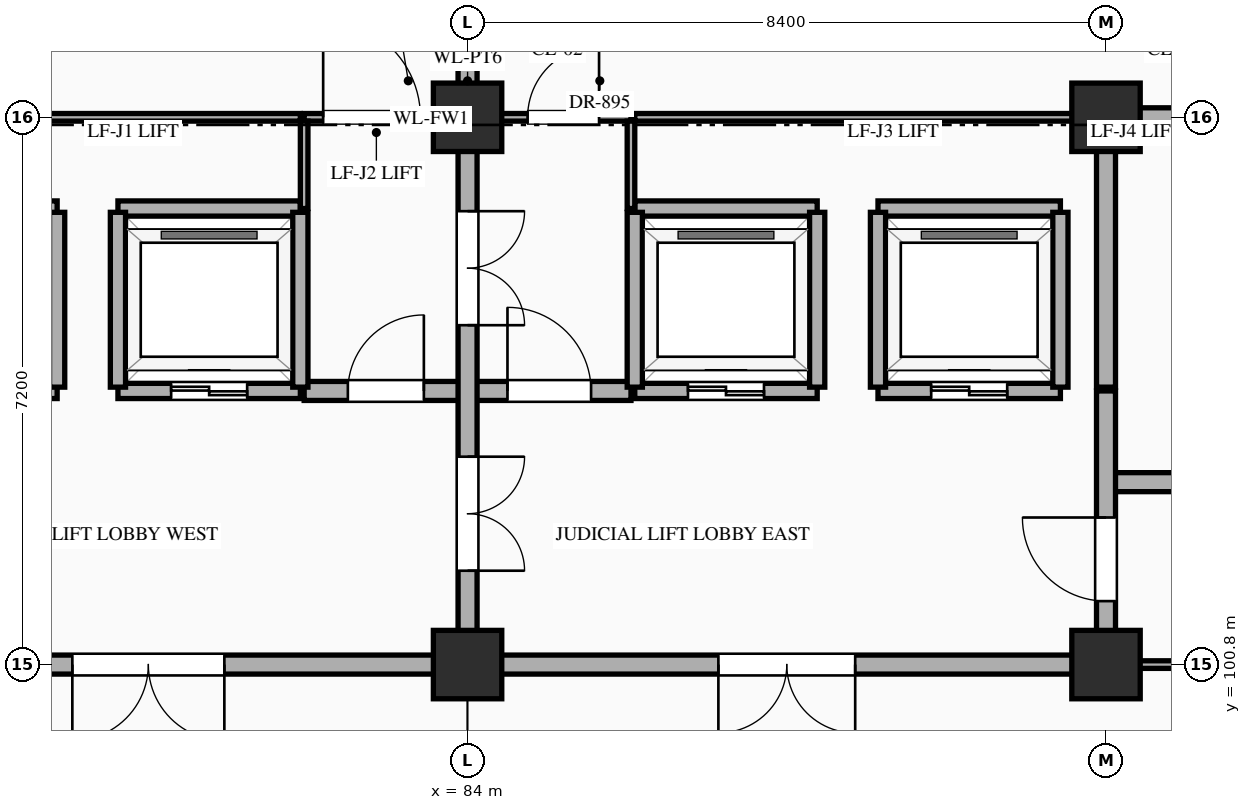
"""IFC4 building model, lengths in metres.
Left out: names, types, materials, properties, quantities, classifications, styles, units other than length and angle.
Written with IfcOpenShell. Run it as: python <this file> out.ifc"""

import sys

from ifc_helpers import new_model, si_unit, direction, frame, frame_2d, origin, origin_2d, place, context, subcontext, project, spatial, rectangle, extrude, element, fill, save


model = new_model("IFC4")
c1 = context("Model", 3, precision=1e-05, world=origin(), true_north=direction((0.0, 1.0)))
c2 = subcontext(c1, "Body", "Model", "MODEL_VIEW")
j1 = project(units=[si_unit("LENGTHUNIT", "METRE"), si_unit("PLANEANGLEUNIT", "RADIAN")], contexts=[c1])
p1 = place(None, origin())
s1 = spatial("IfcSite", under=j1, at=p1, CompositionType="ELEMENT")
p2 = place(p1, origin())
s2 = spatial("IfcBuilding", under=s1, at=p2, CompositionType="ELEMENT")
p3 = place(p2, origin())
s3 = spatial("IfcBuildingStorey", under=s2, at=p3, CompositionType="ELEMENT", Elevation=0.0)
for number, where, z_axis, x_axis in (
    (1, (84.0, 100.8, 0.0), (0.0, 0.0, 1.0), (1.0, 0.0, 0.0)),
    (2, (84.0, 108.0, 0.0), (0.0, 0.0, 1.0), (1.0, 0.0, 0.0)),
    (3, (92.4, 100.8, 0.0), (0.0, 0.0, 1.0), (1.0, 0.0, 0.0)),
    (4, (92.4, 108.0, 0.0), (0.0, 0.0, 1.0), (1.0, 0.0, 0.0)),
):
    element("IfcColumn", number, at=place(p3, frame(where, z_axis=z_axis, x_axis=x_axis)), inside=s3, PredefinedType="COLUMN", context=c2, shape_type="SweptSolid", body=[
        extrude(rectangle(XDim=0.9, YDim=0.9, at=origin_2d()), origin(), (0.0, 0.0, 1.0), 5.4),
    ])
p4 = place(p3, frame((75.6, 100.8, 0.0), z_axis=(0.0, 0.0, 1.0), x_axis=(1.0, 0.0, 0.0)))
e5 = element("IfcWall", 5, at=p4, inside=s3, PredefinedType="STANDARD", context=c2, shape_type="SweptSolid", body=[
    extrude(rectangle(XDim=16.8, YDim=0.25, at=frame_2d((8.4, 0.0))), origin(), (0.0, 0.0, 1.0), 4.27),
])
p5 = place(p4, frame((3.2, 0.0, 0.0)))
e6 = element("IfcOpeningElement", 6, at=p5, cuts=e5, PredefinedType="OPENING", context=c2, shape_type="SweptSolid", body=[
    extrude(rectangle(XDim=2.0, YDim=2.4, at=frame_2d((1.0, 1.2))), frame((0.0, 0.137, 0.0), z_axis=(0.0, -1.0, 0.0), x_axis=(1.0, 0.0, 0.0)), (0.0, 0.0, 1.0), 0.274),
])
p6 = place(p4, frame((11.7, 0.0, 0.0)))
e7 = element("IfcOpeningElement", 7, at=p6, cuts=e5, PredefinedType="OPENING", context=c2, shape_type="SweptSolid", body=[
    extrude(rectangle(XDim=1.8, YDim=2.35, at=frame_2d((0.9, 1.175))), frame((0.0, 0.137, 0.0), z_axis=(0.0, -1.0, 0.0), x_axis=(1.0, 0.0, 0.0)), (0.0, 0.0, 1.0), 0.274),
])
p7 = place(p3, frame((92.4, 100.8, 0.0), z_axis=(0.0, 0.0, 1.0), x_axis=(1.0, 0.0, 0.0)))
e8 = element("IfcWall", 8, at=p7, inside=s3, PredefinedType="STANDARD", context=c2, shape_type="SweptSolid", body=[
    extrude(rectangle(XDim=4.2, YDim=0.1, at=frame_2d((2.1, 0.0))), origin(), (0.0, 0.0, 1.0), 4.27),
])
p8 = place(p7, frame((1.46, 0.0, 0.0)))
e9 = element("IfcOpeningElement", 9, at=p8, cuts=e8, PredefinedType="OPENING", context=c2, shape_type="SweptSolid", body=[
    extrude(rectangle(XDim=1.65, YDim=2.4, at=frame_2d((0.825, 1.2))), frame((0.0, 0.062, 0.0), z_axis=(0.0, -1.0, 0.0), x_axis=(1.0, 0.0, 0.0)), (0.0, 0.0, 1.0), 0.124),
])
p9 = place(p3, frame((92.4, 103.2, 0.0), z_axis=(0.0, 0.0, 1.0), x_axis=(1.0, 0.0, 0.0)))
e10 = element("IfcWall", 10, at=p9, inside=s3, PredefinedType="STANDARD", context=c2, shape_type="SweptSolid", body=[
    extrude(rectangle(XDim=4.2, YDim=0.25, at=frame_2d((2.1, 0.0))), origin(), (0.0, 0.0, 1.0), 5.12),
])
p10 = place(p9, frame((1.6, 0.0, 0.0)))
e11 = element("IfcOpeningElement", 11, at=p10, cuts=e10, PredefinedType="OPENING", context=c2, shape_type="SweptSolid", body=[
    extrude(rectangle(XDim=1.0, YDim=2.2, at=frame_2d((0.5, 1.1))), frame((0.0, 0.137, 0.0), z_axis=(0.0, -1.0, 0.0), x_axis=(1.0, 0.0, 0.0)), (0.0, 0.0, 1.0), 0.274),
])
p11 = place(p3, frame((76.2, 104.4, 0.0), z_axis=(0.0, 0.0, 1.0), x_axis=(1.0, 0.0, 0.0)))
e12 = element("IfcWall", 12, at=p11, inside=s3, PredefinedType="STANDARD", context=c2, shape_type="SweptSolid", body=[
    extrude(rectangle(XDim=2.4, YDim=0.2, at=frame_2d((1.2, 0.0))), origin(), (0.0, 0.0, 1.0), 5.12),
])
p12 = place(p11, frame((0.7, 0.0, 0.0)))
e13 = element("IfcOpeningElement", 13, at=p12, cuts=e12, PredefinedType="OPENING", context=c2, shape_type="SweptSolid", body=[
    extrude(rectangle(XDim=1.0, YDim=2.15, at=frame_2d((0.5, 1.075))), frame((0.0, 0.112, 0.0), z_axis=(0.0, -1.0, 0.0), x_axis=(1.0, 0.0, 0.0)), (0.0, 0.0, 1.0), 0.224),
])
p13 = place(p3, frame((79.4, 104.4, 0.0), z_axis=(0.0, 0.0, 1.0), x_axis=(1.0, 0.0, 0.0)))
e14 = element("IfcWall", 14, at=p13, inside=s3, PredefinedType="STANDARD", context=c2, shape_type="SweptSolid", body=[
    extrude(rectangle(XDim=2.4, YDim=0.2, at=frame_2d((1.2, 0.0))), origin(), (0.0, 0.0, 1.0), 5.12),
])
p14 = place(p13, frame((0.7, 0.0, 0.0)))
e15 = element("IfcOpeningElement", 15, at=p14, cuts=e14, PredefinedType="OPENING", context=c2, shape_type="SweptSolid", body=[
    extrude(rectangle(XDim=1.0, YDim=2.15, at=frame_2d((0.5, 1.075))), frame((0.0, 0.112, 0.0), z_axis=(0.0, -1.0, 0.0), x_axis=(1.0, 0.0, 0.0)), (0.0, 0.0, 1.0), 0.224),
])
p15 = place(p3, frame((81.85, 104.4, 0.0), z_axis=(0.0, 0.0, 1.0), x_axis=(1.0, 0.0, 0.0)))
e16 = element("IfcWall", 16, at=p15, inside=s3, PredefinedType="STANDARD", context=c2, shape_type="SweptSolid", body=[
    extrude(rectangle(XDim=4.3, YDim=0.25, at=frame_2d((2.15, 0.0))), origin(), (0.0, 0.0, 1.0), 5.12),
])
p16 = place(p15, frame((0.575, 0.0, 0.0)))
e17 = element("IfcOpeningElement", 17, at=p16, cuts=e16, PredefinedType="OPENING", context=c2, shape_type="SweptSolid", body=[
    extrude(rectangle(XDim=1.0, YDim=2.2, at=frame_2d((0.5, 1.1))), frame((0.0, 0.137, 0.0), z_axis=(0.0, -1.0, 0.0), x_axis=(1.0, 0.0, 0.0)), (0.0, 0.0, 1.0), 0.274),
])
p17 = place(p15, frame((2.675, 0.0, 0.0)))
e18 = element("IfcOpeningElement", 18, at=p17, cuts=e16, PredefinedType="OPENING", context=c2, shape_type="SweptSolid", body=[
    extrude(rectangle(XDim=1.1, YDim=2.2, at=frame_2d((0.55, 1.1))), frame((0.0, 0.137, 0.0), z_axis=(0.0, -1.0, 0.0), x_axis=(1.0, 0.0, 0.0)), (0.0, 0.0, 1.0), 0.274),
])
p18 = place(p3, frame((86.2, 104.4, 0.0), z_axis=(0.0, 0.0, 1.0), x_axis=(1.0, 0.0, 0.0)))
e19 = element("IfcWall", 19, at=p18, inside=s3, PredefinedType="STANDARD", context=c2, shape_type="SweptSolid", body=[
    extrude(rectangle(XDim=2.4, YDim=0.2, at=frame_2d((1.2, 0.0))), origin(), (0.0, 0.0, 1.0), 5.12),
])
p19 = place(p18, frame((0.7, 0.0, 0.0)))
e20 = element("IfcOpeningElement", 20, at=p19, cuts=e19, PredefinedType="OPENING", context=c2, shape_type="SweptSolid", body=[
    extrude(rectangle(XDim=1.0, YDim=2.15, at=frame_2d((0.5, 1.075))), frame((0.0, 0.112, 0.0), z_axis=(0.0, -1.0, 0.0), x_axis=(1.0, 0.0, 0.0)), (0.0, 0.0, 1.0), 0.224),
])
p20 = place(p3, frame((89.4, 104.4, 0.0), z_axis=(0.0, 0.0, 1.0), x_axis=(1.0, 0.0, 0.0)))
e21 = element("IfcWall", 21, at=p20, inside=s3, PredefinedType="STANDARD", context=c2, shape_type="SweptSolid", body=[
    extrude(rectangle(XDim=2.4, YDim=0.2, at=frame_2d((1.2, 0.0))), origin(), (0.0, 0.0, 1.0), 5.12),
])
p21 = place(p20, frame((0.7, 0.0, 0.0)))
e22 = element("IfcOpeningElement", 22, at=p21, cuts=e21, PredefinedType="OPENING", context=c2, shape_type="SweptSolid", body=[
    extrude(rectangle(XDim=1.0, YDim=2.15, at=frame_2d((0.5, 1.075))), frame((0.0, 0.112, 0.0), z_axis=(0.0, -1.0, 0.0), x_axis=(1.0, 0.0, 0.0)), (0.0, 0.0, 1.0), 0.224),
])
for number, where, z_axis, x_axis in (
    (23, (76.2, 106.8, 0.0), (0.0, 0.0, 1.0), (1.0, 0.0, 0.0)),
    (24, (79.4, 106.8, 0.0), (0.0, 0.0, 1.0), (1.0, 0.0, 0.0)),
    (25, (86.2, 106.8, 0.0), (0.0, 0.0, 1.0), (1.0, 0.0, 0.0)),
    (26, (89.4, 106.8, 0.0), (0.0, 0.0, 1.0), (1.0, 0.0, 0.0)),
):
    element("IfcWall", number, at=place(p3, frame(where, z_axis=z_axis, x_axis=x_axis)), inside=s3, PredefinedType="STANDARD", context=c2, shape_type="SweptSolid", body=[
        extrude(rectangle(XDim=2.4, YDim=0.2, at=frame_2d((1.2, 0.0))), origin(), (0.0, 0.0, 1.0), 5.12),
    ])
p22 = place(p3, frame((75.65, 108.0, 0.0), z_axis=(0.0, 0.0, 1.0), x_axis=(1.0, 0.0, 0.0)))
e27 = element("IfcWall", 27, at=p22, inside=s3, PredefinedType="STANDARD", context=c2, shape_type="SweptSolid", body=[
    extrude(rectangle(XDim=6.15, YDim=0.1, at=frame_2d((3.075, 0.0))), origin(), (0.0, 0.0, 1.0), 4.27),
])
p23 = place(p3, frame((81.85, 108.0, 0.0), z_axis=(0.0, 0.0, 1.0), x_axis=(1.0, 0.0, 0.0)))
e28 = element("IfcWall", 28, at=p23, inside=s3, PredefinedType="STANDARD", context=c2, shape_type="SweptSolid", body=[
    extrude(rectangle(XDim=4.3, YDim=0.1, at=frame_2d((2.15, 0.0))), origin(), (0.0, 0.0, 1.0), 4.27),
])
p24 = place(p23, frame((0.25, 0.0, 0.0)))
e29 = element("IfcOpeningElement", 29, at=p24, cuts=e28, PredefinedType="OPENING", context=c2, shape_type="SweptSolid", body=[
    extrude(rectangle(XDim=1.28, YDim=2.35, at=frame_2d((0.64, 1.175))), frame((0.0, 0.062, 0.0), z_axis=(0.0, -1.0, 0.0), x_axis=(1.0, 0.0, 0.0)), (0.0, 0.0, 1.0), 0.124),
])
p25 = place(p23, frame((2.94, 0.0, 0.0)))
e30 = element("IfcOpeningElement", 30, at=p25, cuts=e28, PredefinedType="OPENING", context=c2, shape_type="SweptSolid", body=[
    extrude(rectangle(XDim=0.94, YDim=2.3, at=frame_2d((0.47, 1.15))), frame((0.0, 0.062, 0.0), z_axis=(0.0, -1.0, 0.0), x_axis=(1.0, 0.0, 0.0)), (0.0, 0.0, 1.0), 0.124),
])
p26 = place(p3, frame((86.2, 108.0, 0.0), z_axis=(0.0, 0.0, 1.0), x_axis=(1.0, 0.0, 0.0)))
e31 = element("IfcWall", 31, at=p26, inside=s3, PredefinedType="STANDARD", context=c2, shape_type="SweptSolid", body=[
    extrude(rectangle(XDim=6.15, YDim=0.1, at=frame_2d((3.075, 0.0))), origin(), (0.0, 0.0, 1.0), 4.27),
])
p27 = place(p3, frame((92.4, 108.0, 0.0), z_axis=(0.0, 0.0, 1.0), x_axis=(1.0, 0.0, 0.0)))
e32 = element("IfcWall", 32, at=p27, inside=s3, PredefinedType="STANDARD", context=c2, shape_type="SweptSolid", body=[
    extrude(rectangle(XDim=4.2, YDim=0.25, at=frame_2d((2.1, 0.0))), origin(), (0.0, 0.0, 1.0), 4.27),
])
p28 = place(p27, frame((1.81, 0.0, 0.0)))
e33 = element("IfcOpeningElement", 33, at=p28, cuts=e32, PredefinedType="OPENING", context=c2, shape_type="SweptSolid", body=[
    extrude(rectangle(XDim=0.95, YDim=2.15, at=frame_2d((0.475, 1.075))), frame((0.0, 0.137, 0.0), z_axis=(0.0, -1.0, 0.0), x_axis=(1.0, 0.0, 0.0)), (0.0, 0.0, 1.0), 0.274),
])
for number, where, z_axis, x_axis in (
    (34, (78.6, 104.45, 0.0), (0.0, 0.0, 1.0), (0.0, 1.0, 0.0)),
    (35, (79.4, 104.45, 0.0), (0.0, 0.0, 1.0), (0.0, 1.0, 0.0)),
    (36, (81.8, 104.45, 0.0), (0.0, 0.0, 1.0), (0.0, 1.0, 0.0)),
):
    element("IfcWall", number, at=place(p3, frame(where, z_axis=z_axis, x_axis=x_axis)), inside=s3, PredefinedType="STANDARD", context=c2, shape_type="SweptSolid", body=[
        extrude(rectangle(XDim=2.3, YDim=0.2, at=frame_2d((1.15, 0.0))), origin(), (0.0, 0.0, 1.0), 5.12),
    ])
p29 = place(p3, frame((81.85, 106.8, 0.0), z_axis=(0.0, 0.0, 1.0), x_axis=(0.0, 1.0, 0.0)))
e37 = element("IfcWall", 37, at=p29, inside=s3, PredefinedType="STANDARD", context=c2, shape_type="SweptSolid", body=[
    extrude(rectangle(XDim=1.15, YDim=0.1, at=frame_2d((0.575, 0.0))), origin(), (0.0, 0.0, 1.0), 5.12),
])
p30 = place(p3, frame((84.0, 100.8, 0.0), z_axis=(0.0, 0.0, 1.0), x_axis=(0.0, 1.0, 0.0)))
e38 = element("IfcWall", 38, at=p30, inside=s3, PredefinedType="STANDARD", context=c2, shape_type="SweptSolid", body=[
    extrude(rectangle(XDim=14.36, YDim=0.25, at=frame_2d((7.18, 0.0))), origin(), (0.0, 0.0, 1.0), 4.37),
])
p31 = place(p30, frame((1.235, 0.0, 0.0)))
e39 = element("IfcOpeningElement", 39, at=p31, cuts=e38, PredefinedType="OPENING", context=c2, shape_type="SweptSolid", body=[
    extrude(rectangle(XDim=1.5, YDim=2.25, at=frame_2d((0.75, 1.125))), frame((0.0, 0.137, 0.0), z_axis=(0.0, -1.0, 0.0), x_axis=(1.0, 0.0, 0.0)), (0.0, 0.0, 1.0), 0.274),
])
p32 = place(p30, frame((4.465, 0.0, 0.0)))
e40 = element("IfcOpeningElement", 40, at=p32, cuts=e38, PredefinedType="OPENING", context=c2, shape_type="SweptSolid", body=[
    extrude(rectangle(XDim=1.5, YDim=2.25, at=frame_2d((0.75, 1.125))), frame((0.0, 0.137, 0.0), z_axis=(0.0, -1.0, 0.0), x_axis=(1.0, 0.0, 0.0)), (0.0, 0.0, 1.0), 0.274),
])
p33 = place(p30, frame((8.085, 0.0, 0.0)))
e41 = element("IfcOpeningElement", 41, at=p33, cuts=e38, PredefinedType="OPENING", context=c2, shape_type="SweptSolid", body=[
    extrude(rectangle(XDim=1.0, YDim=2.2, at=frame_2d((0.5, 1.1))), frame((0.0, 0.137, 0.0), z_axis=(0.0, -1.0, 0.0), x_axis=(1.0, 0.0, 0.0)), (0.0, 0.0, 1.0), 0.274),
])
p34 = place(p3, frame((86.15, 106.8, 0.0), z_axis=(0.0, 0.0, 1.0), x_axis=(0.0, 1.0, 0.0)))
e42 = element("IfcWall", 42, at=p34, inside=s3, PredefinedType="STANDARD", context=c2, shape_type="SweptSolid", body=[
    extrude(rectangle(XDim=1.15, YDim=0.1, at=frame_2d((0.575, 0.0))), origin(), (0.0, 0.0, 1.0), 5.12),
])
for number, where, z_axis, x_axis in (
    (43, (86.2, 104.45, 0.0), (0.0, 0.0, 1.0), (0.0, 1.0, 0.0)),
    (44, (88.6, 104.45, 0.0), (0.0, 0.0, 1.0), (0.0, 1.0, 0.0)),
    (45, (89.4, 104.45, 0.0), (0.0, 0.0, 1.0), (0.0, 1.0, 0.0)),
    (46, (91.8, 104.45, 0.0), (0.0, 0.0, 1.0), (0.0, 1.0, 0.0)),
):
    element("IfcWall", number, at=place(p3, frame(where, z_axis=z_axis, x_axis=x_axis)), inside=s3, PredefinedType="STANDARD", context=c2, shape_type="SweptSolid", body=[
        extrude(rectangle(XDim=2.3, YDim=0.2, at=frame_2d((1.15, 0.0))), origin(), (0.0, 0.0, 1.0), 5.12),
    ])
p35 = place(p3, frame((92.4, 100.8, 0.0), z_axis=(0.0, 0.0, 1.0), x_axis=(0.0, 1.0, 0.0)))
e47 = element("IfcWall", 47, at=p35, inside=s3, PredefinedType="STANDARD", context=c2, shape_type="SweptSolid", body=[
    extrude(rectangle(XDim=3.6, YDim=0.25, at=frame_2d((1.8, 0.0))), origin(), (0.0, 0.0, 1.0), 4.37),
])
p36 = place(p35, frame((0.835, 0.0, 0.0)))
e48 = element("IfcOpeningElement", 48, at=p36, cuts=e47, PredefinedType="OPENING", context=c2, shape_type="SweptSolid", body=[
    extrude(rectangle(XDim=1.1, YDim=2.2, at=frame_2d((0.55, 1.1))), frame((0.0, 0.137, 0.0), z_axis=(0.0, -1.0, 0.0), x_axis=(1.0, 0.0, 0.0)), (0.0, 0.0, 1.0), 0.274),
])
p37 = place(p3, frame((92.4, 104.45, 0.0), z_axis=(0.0, 0.0, 1.0), x_axis=(0.0, 1.0, 0.0)))
e49 = element("IfcWall", 49, at=p37, inside=s3, PredefinedType="STANDARD", context=c2, shape_type="SweptSolid", body=[
    extrude(rectangle(XDim=3.5, YDim=0.25, at=frame_2d((1.75, 0.0))), origin(), (0.0, 0.0, 1.0), 4.37),
])
p38 = place(p14, origin())
e50 = element("IfcDoor", 50, at=p38, inside=s3, OperationType="DOUBLE_DOOR_SLIDING", PredefinedType="DOOR", context=c2, shape_type="SweptSolid", body=[
    extrude(rectangle(XDim=1.0, YDim=2.15, at=frame_2d((0.5, 1.075))), frame((0.0, 0.025, 0.0), z_axis=(0.0, -1.0, 0.0), x_axis=(1.0, 0.0, 0.0)), (0.0, 0.0, 1.0), 0.05),
])
fill(e15, e50)
p39 = place(p19, origin())
e51 = element("IfcDoor", 51, at=p39, inside=s3, OperationType="DOUBLE_DOOR_SLIDING", PredefinedType="DOOR", context=c2, shape_type="SweptSolid", body=[
    extrude(rectangle(XDim=1.0, YDim=2.15, at=frame_2d((0.5, 1.075))), frame((0.0, 0.025, 0.0), z_axis=(0.0, -1.0, 0.0), x_axis=(1.0, 0.0, 0.0)), (0.0, 0.0, 1.0), 0.05),
])
fill(e20, e51)
p40 = place(p21, origin())
e52 = element("IfcDoor", 52, at=p40, inside=s3, OperationType="DOUBLE_DOOR_SLIDING", PredefinedType="DOOR", context=c2, shape_type="SweptSolid", body=[
    extrude(rectangle(XDim=1.0, YDim=2.15, at=frame_2d((0.5, 1.075))), frame((0.0, 0.025, 0.0), z_axis=(0.0, -1.0, 0.0), x_axis=(1.0, 0.0, 0.0)), (0.0, 0.0, 1.0), 0.05),
])
fill(e22, e52)
p41 = place(p36, origin())
e53 = element("IfcDoor", 53, at=p41, inside=s3, OperationType="SINGLE_SWING_RIGHT", PredefinedType="DOOR", context=c2, shape_type="SweptSolid", body=[
    extrude(rectangle(XDim=1.1, YDim=2.2, at=frame_2d((0.55, 1.1))), frame((0.0, 0.025, 0.0), z_axis=(0.0, -1.0, 0.0), x_axis=(1.0, 0.0, 0.0)), (0.0, 0.0, 1.0), 0.05),
])
fill(e48, e53)
p42 = place(p31, frame((1.5, 0.0, 0.0), z_axis=(0.0, 0.0, 1.0), x_axis=(-1.0, 0.0, 0.0)))
e54 = element("IfcDoor", 54, at=p42, inside=s3, OperationType="DOUBLE_DOOR_SINGLE_SWING", PredefinedType="DOOR", context=c2, shape_type="SweptSolid", body=[
    extrude(rectangle(XDim=1.5, YDim=2.25, at=frame_2d((0.75, 1.125))), frame((0.0, 0.025, 0.0), z_axis=(0.0, -1.0, 0.0), x_axis=(1.0, 0.0, 0.0)), (0.0, 0.0, 1.0), 0.05),
])
fill(e39, e54)
p43 = place(p5, frame((2.0, 0.0, 0.0), z_axis=(0.0, 0.0, 1.0), x_axis=(-1.0, 0.0, 0.0)))
e55 = element("IfcDoor", 55, at=p43, inside=s3, OperationType="DOUBLE_DOOR_SINGLE_SWING", PredefinedType="DOOR", context=c2, shape_type="SweptSolid", body=[
    extrude(rectangle(XDim=2.0, YDim=2.4, at=frame_2d((1.0, 1.2))), frame((0.0, 0.025, 0.0), z_axis=(0.0, -1.0, 0.0), x_axis=(1.0, 0.0, 0.0)), (0.0, 0.0, 1.0), 0.05),
])
fill(e6, e55)
p44 = place(p16, origin())
e56 = element("IfcDoor", 56, at=p44, inside=s3, OperationType="SINGLE_SWING_RIGHT", PredefinedType="DOOR", context=c2, shape_type="SweptSolid", body=[
    extrude(rectangle(XDim=1.0, YDim=2.2, at=frame_2d((0.5, 1.1))), frame((0.0, 0.025, 0.0), z_axis=(0.0, -1.0, 0.0), x_axis=(1.0, 0.0, 0.0)), (0.0, 0.0, 1.0), 0.05),
])
fill(e17, e56)
p45 = place(p6, frame((1.8, 0.0, 0.0), z_axis=(0.0, 0.0, 1.0), x_axis=(-1.0, 0.0, 0.0)))
e57 = element("IfcDoor", 57, at=p45, inside=s3, OperationType="DOUBLE_DOOR_SINGLE_SWING", PredefinedType="DOOR", context=c2, shape_type="SweptSolid", body=[
    extrude(rectangle(XDim=1.8, YDim=2.35, at=frame_2d((0.9, 1.175))), frame((0.0, 0.025, 0.0), z_axis=(0.0, -1.0, 0.0), x_axis=(1.0, 0.0, 0.0)), (0.0, 0.0, 1.0), 0.05),
])
fill(e7, e57)
p46 = place(p17, origin())
e58 = element("IfcDoor", 58, at=p46, inside=s3, OperationType="SINGLE_SWING_LEFT", PredefinedType="DOOR", context=c2, shape_type="SweptSolid", body=[
    extrude(rectangle(XDim=1.1, YDim=2.2, at=frame_2d((0.55, 1.1))), frame((0.0, 0.025, 0.0), z_axis=(0.0, -1.0, 0.0), x_axis=(1.0, 0.0, 0.0)), (0.0, 0.0, 1.0), 0.05),
])
fill(e18, e58)
p47 = place(p32, frame((1.5, 0.0, 0.0), z_axis=(0.0, 0.0, 1.0), x_axis=(-1.0, 0.0, 0.0)))
e59 = element("IfcDoor", 59, at=p47, inside=s3, OperationType="DOUBLE_DOOR_SINGLE_SWING", PredefinedType="DOOR", context=c2, shape_type="SweptSolid", body=[
    extrude(rectangle(XDim=1.5, YDim=2.25, at=frame_2d((0.75, 1.125))), frame((0.0, 0.025, 0.0), z_axis=(0.0, -1.0, 0.0), x_axis=(1.0, 0.0, 0.0)), (0.0, 0.0, 1.0), 0.05),
])
fill(e40, e59)
p48 = place(p24, origin())
e60 = element("IfcDoor", 60, at=p48, inside=s3, OperationType="SINGLE_SWING_LEFT", PredefinedType="DOOR", context=c2, shape_type="SweptSolid", body=[
    extrude(rectangle(XDim=1.28, YDim=2.35, at=frame_2d((0.64, 1.175))), frame((0.0, 0.025, 0.0), z_axis=(0.0, -1.0, 0.0), x_axis=(1.0, 0.0, 0.0)), (0.0, 0.0, 1.0), 0.05),
])
fill(e29, e60)
p49 = place(p25, origin())
e61 = element("IfcDoor", 61, at=p49, inside=s3, OperationType="SINGLE_SWING_RIGHT", PredefinedType="DOOR", context=c2, shape_type="SweptSolid", body=[
    extrude(rectangle(XDim=0.94, YDim=2.3, at=frame_2d((0.47, 1.15))), frame((0.0, 0.025, 0.0), z_axis=(0.0, -1.0, 0.0), x_axis=(1.0, 0.0, 0.0)), (0.0, 0.0, 1.0), 0.05),
])
fill(e30, e61)
save(model, sys.argv[1])
